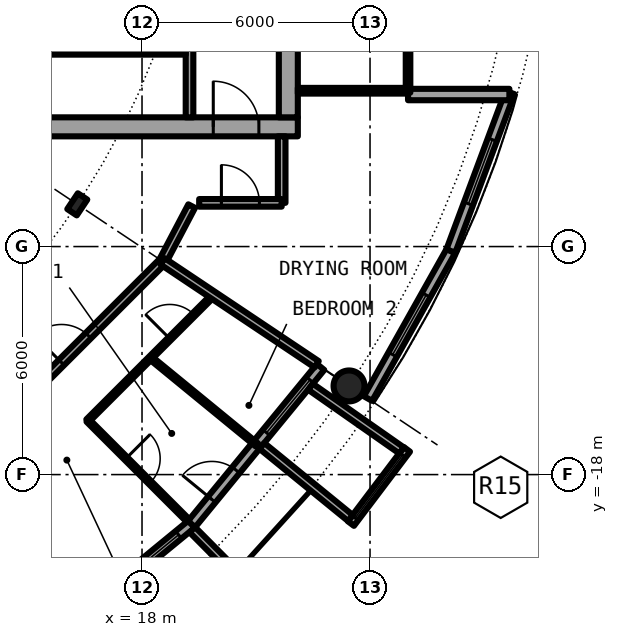
"""IFC4 building model, lengths in metres.
Left out: names, types, materials, properties, quantities, classifications, styles, units other than length and angle.
Written with IfcOpenShell. Run it as: python <this file> out.ifc"""

import sys

from ifc_helpers import new_model, si_unit, direction, frame, frame_2d, origin, origin_2d, place, context, subcontext, project, spatial, rectangle, circle, hollow_circle, i_section, extrude, element, fill, save


model = new_model("IFC4")
c1 = context("Model", 3, precision=1e-05, world=origin(), true_north=direction((0.0, 1.0)))
c2 = subcontext(c1, "Body", "Model", "MODEL_VIEW")
j1 = project(units=[si_unit("LENGTHUNIT", "METRE"), si_unit("PLANEANGLEUNIT", "RADIAN")], contexts=[c1])
p1 = place(None, origin())
s1 = spatial("IfcSite", under=j1, at=p1, CompositionType="ELEMENT")
p2 = place(p1, origin())
s2 = spatial("IfcBuilding", under=s1, at=p2, CompositionType="ELEMENT")
p3 = place(p2, frame((0.0, 0.0, 173.8)))
s3 = spatial("IfcBuildingStorey", under=s2, at=p3, CompositionType="ELEMENT", Elevation=173.8)
p4 = place(p3, frame((23.448, -15.667, 0.0), z_axis=(0.0, 0.0, 1.0), x_axis=(1.0, 0.0, 0.0)))
e1 = element("IfcColumn", 1, at=p4, inside=s3, PredefinedType="COLUMN", context=c2, shape_type="SweptSolid", body=[
    extrude(hollow_circle(Radius=0.406, WallThickness=0.04, at=origin_2d()), origin(), (0.0, 0.0, 1.0), 3.05),
])
p5 = place(p3, frame((16.297, -10.889, 0.0), z_axis=(0.0, 0.0, 1.0), x_axis=(0.831469612303, -0.55557023302, 0.0)))
e2 = element("IfcColumn", 2, at=p5, inside=s3, PredefinedType="COLUMN", context=c2, shape_type="SweptSolid", body=[
    extrude(i_section(OverallWidth=0.3, OverallDepth=0.5, WebThickness=0.014, FlangeThickness=0.028, FilletRadius=0.027, at=origin_2d()), origin(), (0.0, 0.0, 1.0), 3.05),
])
p6 = place(p3, frame((15.167, -22.699, 0.0), z_axis=(0.0, 0.0, 1.0), x_axis=(0.773019449054, 0.634382322723, 0.0)))
e3 = element("IfcWall", 3, at=p6, inside=s3, PredefinedType="SOLIDWALL", context=c2, shape_type="SweptSolid", body=[
    extrude(rectangle(XDim=5.352, YDim=0.25, at=frame_2d((2.676, 0.0))), origin(), (0.0, 0.0, 1.0), 2.7),
])
p7 = place(p6, frame((0.841, 0.0, 0.0)))
e4 = element("IfcOpeningElement", 4, at=p7, cuts=e3, PredefinedType="OPENING", context=c2, shape_type="SweptSolid", body=[
    extrude(rectangle(XDim=1.0, YDim=2.2, at=frame_2d((0.5, 1.1))), frame((0.0, 0.135, 0.0), z_axis=(0.0, -1.0, 0.0), x_axis=(1.0, 0.0, 0.0)), (0.0, 0.0, 1.0), 0.27),
])
p8 = place(p6, frame((3.111, 0.0, 0.3)))
e5 = element("IfcOpeningElement", 5, at=p8, cuts=e3, PredefinedType="OPENING", context=c2, shape_type="SweptSolid", body=[
    extrude(rectangle(XDim=1.8, YDim=2.1, at=frame_2d((0.9, 1.05))), frame((0.0, 0.135, 0.0), z_axis=(0.0, -1.0, 0.0), x_axis=(1.0, 0.0, 0.0)), (0.0, 0.0, 1.0), 0.27),
])
p9 = place(p3, frame((19.323, -19.45, -0.03), z_axis=(0.0, 0.0, 1.0), x_axis=(0.704476739375, -0.709727076896, 0.0)))
e6 = element("IfcWall", 6, at=p9, inside=s3, PredefinedType="SOLIDWALL", context=c2, shape_type="SweptSolid", body=[
    extrude(rectangle(XDim=2.883, YDim=0.2, at=frame_2d((1.441, 0.0))), origin(), (0.0, 0.0, 1.0), 2.73),
])
p10 = place(p3, frame((19.304, -19.304, 0.0), z_axis=(0.0, 0.0, 1.0), x_axis=(0.634382322723, 0.773019449054, 0.0)))
e7 = element("IfcWall", 7, at=p10, inside=s3, PredefinedType="SOLIDWALL", context=c2, shape_type="SweptSolid", body=[
    extrude(rectangle(XDim=5.352, YDim=0.25, at=frame_2d((2.676, 0.0))), origin(), (0.0, 0.0, 1.0), 2.7),
])
p11 = place(p10, frame((0.841, 0.0, 0.0)))
e8 = element("IfcOpeningElement", 8, at=p11, cuts=e7, PredefinedType="OPENING", context=c2, shape_type="SweptSolid", body=[
    extrude(rectangle(XDim=1.0, YDim=2.2, at=frame_2d((0.5, 1.1))), frame((0.0, 0.135, 0.0), z_axis=(0.0, -1.0, 0.0), x_axis=(1.0, 0.0, 0.0)), (0.0, 0.0, 1.0), 0.27),
])
p12 = place(p10, frame((3.111, 0.0, 0.3)))
e9 = element("IfcOpeningElement", 9, at=p12, cuts=e7, PredefinedType="OPENING", context=c2, shape_type="SweptSolid", body=[
    extrude(rectangle(XDim=1.8, YDim=2.1, at=frame_2d((0.9, 1.05))), frame((0.0, 0.135, 0.0), z_axis=(0.0, -1.0, 0.0), x_axis=(1.0, 0.0, 0.0)), (0.0, 0.0, 1.0), 0.27),
])
p13 = place(p3, frame((23.497, -19.289, -0.03), z_axis=(0.0, 0.0, 1.0), x_axis=(0.602806268067, 0.797887588059, 0.0)))
e10 = element("IfcWall", 10, at=p13, inside=s3, PredefinedType="SOLIDWALL", context=c2, shape_type="SweptSolid", body=[
    extrude(rectangle(XDim=2.447, YDim=0.2, at=frame_2d((1.223, 0.0))), origin(), (0.0, 0.0, 1.0), 2.73),
])
p14 = place(p13, frame((0.183, 0.0, 0.33)))
e11 = element("IfcOpeningElement", 11, at=p14, cuts=e10, PredefinedType="OPENING", context=c2, shape_type="SweptSolid", body=[
    extrude(circle(Radius=1.04, at=frame_2d((1.04, 1.04))), frame((0.0, 0.11, 0.0), z_axis=(0.0, -1.0, 0.0), x_axis=(1.0, 0.0, 0.0)), (0.0, 0.0, 1.0), 0.22),
])
p15 = place(p3, frame((21.155, -17.246, -0.03), z_axis=(0.0, 0.0, 1.0), x_axis=(0.775179004516, -0.631741648902, 0.0)))
e12 = element("IfcWall", 12, at=p15, inside=s3, PredefinedType="SOLIDWALL", context=c2, shape_type="SweptSolid", body=[
    extrude(rectangle(XDim=3.006, YDim=0.2, at=frame_2d((1.503, 0.0))), origin(), (0.0, 0.0, 1.0), 2.73),
])
p16 = place(p3, frame((22.433, -15.688, -0.03), z_axis=(0.0, 0.0, 1.0), x_axis=(0.819373043115, -0.573260687834, 0.0)))
e13 = element("IfcWall", 13, at=p16, inside=s3, PredefinedType="SOLIDWALL", context=c2, shape_type="SweptSolid", body=[
    extrude(rectangle(XDim=2.925, YDim=0.2, at=frame_2d((1.463, 0.0))), origin(), (0.0, 0.0, 1.0), 2.73),
])
p17 = place(p3, frame((23.946, -16.0, 0.0), z_axis=(0.0, 0.0, 1.0), x_axis=(0.489696356642, 0.871893042919, 0.0)))
e14 = element("IfcWall", 14, at=p17, inside=s3, PredefinedType="SOLIDWALL", context=c2, shape_type="SweptSolid", body=[
    extrude(rectangle(XDim=4.454, YDim=0.25, at=frame_2d((2.227, 0.0))), origin(), (0.0, 0.0, 1.0), 2.7),
])
p18 = place(p17, frame((1.327, 0.0, 0.3)))
e15 = element("IfcOpeningElement", 15, at=p18, cuts=e14, PredefinedType="OPENING", context=c2, shape_type="SweptSolid", body=[
    extrude(rectangle(XDim=1.8, YDim=2.1, at=frame_2d((0.9, 1.05))), frame((0.0, 0.135, 0.0), z_axis=(0.0, -1.0, 0.0), x_axis=(1.0, 0.0, 0.0)), (0.0, 0.0, 1.0), 0.27),
])
p19 = place(p3, frame((26.127, -12.117, 0.0), z_axis=(0.0, 0.0, 1.0), x_axis=(0.349247811493, 0.937030397675, 0.0)))
e16 = element("IfcWall", 16, at=p19, inside=s3, PredefinedType="SOLIDWALL", context=c2, shape_type="SweptSolid", body=[
    extrude(rectangle(XDim=4.452, YDim=0.25, at=frame_2d((2.226, 0.0))), origin(), (0.0, 0.0, 1.0), 2.7),
])
p20 = place(p19, frame((1.327, 0.0, 0.3)))
e17 = element("IfcOpeningElement", 17, at=p20, cuts=e16, PredefinedType="OPENING", context=c2, shape_type="SweptSolid", body=[
    extrude(rectangle(XDim=1.8, YDim=2.1, at=frame_2d((0.9, 1.05))), frame((0.0, 0.135, 0.0), z_axis=(0.0, -1.0, 0.0), x_axis=(1.0, 0.0, 0.0)), (0.0, 0.0, 1.0), 0.27),
])
p21 = place(p3, frame((25.0, -8.0, 0.0), z_axis=(0.0, 0.0, 1.0), x_axis=(1.0, 0.0, 0.0)))
e18 = element("IfcWall", 18, at=p21, inside=s3, PredefinedType="SOLIDWALL", context=c2, shape_type="SweptSolid", body=[
    extrude(rectangle(XDim=2.667, YDim=0.3, at=frame_2d((1.333, 0.0))), origin(), (0.0, 0.0, 1.0), 2.7),
])
p22 = place(p3, frame((8.5, -8.85, 0.0), z_axis=(0.0, 0.0, 1.0), x_axis=(1.0, 0.0, 0.0)))
e19 = element("IfcWall", 19, at=p22, inside=s3, PredefinedType="SHEAR", context=c2, shape_type="SweptSolid", body=[
    extrude(rectangle(XDim=13.6, YDim=0.5, at=frame_2d((6.8, 0.0))), origin(), (0.0, 0.0, 1.0), 3.05),
])
p23 = place(p22, frame((11.375, 0.0, 0.0)))
e20 = element("IfcOpeningElement", 20, at=p23, cuts=e19, PredefinedType="OPENING", context=c2, shape_type="SweptSolid", body=[
    extrude(rectangle(XDim=1.2, YDim=2.3, at=frame_2d((0.6, 1.15))), frame((0.0, 0.26, 0.0), z_axis=(0.0, -1.0, 0.0), x_axis=(1.0, 0.0, 0.0)), (0.0, 0.0, 1.0), 0.52),
])
p24 = place(p3, frame((21.85, 8.6, 0.0), z_axis=(0.0, 0.0, 1.0), x_axis=(0.0, -1.0, 0.0)))
e21 = element("IfcWall", 21, at=p24, inside=s3, PredefinedType="SHEAR", context=c2, shape_type="SweptSolid", body=[
    extrude(rectangle(XDim=17.2, YDim=0.5, at=frame_2d((8.6, 0.0))), origin(), (0.0, 0.0, 1.0), 3.05),
])
p25 = place(p24, frame((7.7, 0.0, 0.0)))
e22 = element("IfcOpeningElement", 22, at=p25, cuts=e21, PredefinedType="OPENING", context=c2, shape_type="SweptSolid", body=[
    extrude(rectangle(XDim=1.8, YDim=2.3, at=frame_2d((0.9, 1.15))), frame((0.0, 0.26, 0.0), z_axis=(0.0, -1.0, 0.0), x_axis=(1.0, 0.0, 0.0)), (0.0, 0.0, 1.0), 0.52),
])
p26 = place(p3, frame((19.25, -8.6, 0.0), z_axis=(0.0, 0.0, 1.0), x_axis=(0.0, 1.0, 0.0)))
e23 = element("IfcWall", 23, at=p26, inside=s3, PredefinedType="SOLIDWALL", context=c2, shape_type="SweptSolid", body=[
    extrude(rectangle(XDim=7.025, YDim=0.2, at=frame_2d((3.513, 0.0))), origin(), (0.0, 0.0, 1.0), 2.7),
])
p27 = place(p26, frame((2.35, 0.0, 0.0)))
e24 = element("IfcOpeningElement", 24, at=p27, cuts=e23, PredefinedType="OPENING", context=c2, shape_type="SweptSolid", body=[
    extrude(rectangle(XDim=1.1, YDim=2.3, at=frame_2d((0.55, 1.15))), frame((0.0, 0.11, 0.0), z_axis=(0.0, -1.0, 0.0), x_axis=(1.0, 0.0, 0.0)), (0.0, 0.0, 1.0), 0.22),
])
p28 = place(p3, frame((15.45, -6.875, 0.0), z_axis=(0.0, 0.0, 1.0), x_axis=(1.0, 0.0, 0.0)))
e25 = element("IfcWall", 25, at=p28, inside=s3, PredefinedType="PARTITIONING", context=c2, shape_type="SweptSolid", body=[
    extrude(rectangle(XDim=3.7, YDim=0.15, at=frame_2d((1.85, 0.0))), origin(), (0.0, 0.0, 1.0), 2.7),
])
p29 = place(p28, frame((1.4, 0.0, 0.0)))
e26 = element("IfcOpeningElement", 26, at=p29, cuts=e25, PredefinedType="OPENING", context=c2, shape_type="SweptSolid", body=[
    extrude(rectangle(XDim=0.9, YDim=2.3, at=frame_2d((0.45, 1.15))), frame((0.0, 0.085, 0.0), z_axis=(0.0, -1.0, 0.0), x_axis=(1.0, 0.0, 0.0)), (0.0, 0.0, 1.0), 0.17),
])
p30 = place(p3, frame((22.1, -7.9, 0.0), z_axis=(0.0, 0.0, 1.0), x_axis=(1.0, 0.0, 0.0)))
e27 = element("IfcWall", 27, at=p30, inside=s3, PredefinedType="PARTITIONING", context=c2, shape_type="SweptSolid", body=[
    extrude(rectangle(XDim=2.84, YDim=0.15, at=frame_2d((1.42, 0.0))), origin(), (0.0, 0.0, 1.0), 2.7),
])
p31 = place(p3, frame((25.0, -7.95, 0.0), z_axis=(0.0, 0.0, 1.0), x_axis=(0.0, 1.0, 0.0)))
e28 = element("IfcWall", 28, at=p31, inside=s3, PredefinedType="PARTITIONING", context=c2, shape_type="SweptSolid", body=[
    extrude(rectangle(XDim=15.9, YDim=0.12, at=frame_2d((7.95, 0.0))), origin(), (0.0, 0.0, 1.0), 2.7),
])
p32 = place(p31, frame((0.95, 0.0, 0.1)))
e29 = element("IfcOpeningElement", 29, at=p32, cuts=e28, PredefinedType="OPENING", context=c2, shape_type="SweptSolid", body=[
    extrude(rectangle(XDim=14.0, YDim=2.35, at=frame_2d((7.0, 1.175))), frame((0.0, 0.07, 0.0), z_axis=(0.0, -1.0, 0.0), x_axis=(1.0, 0.0, 0.0)), (0.0, 0.0, 1.0), 0.14),
])
p33 = place(p3, frame((16.569, -16.583, 0.0), z_axis=(0.0, 0.0, 1.0), x_axis=(0.707316201218, 0.706897299114, 0.0)))
e30 = element("IfcWall", 30, at=p33, inside=s3, PredefinedType="PARTITIONING", context=c2, shape_type="SweptSolid", body=[
    extrude(rectangle(XDim=4.663, YDim=0.1, at=frame_2d((2.331, 0.0))), origin(), (0.0, 0.0, 1.0), 2.7),
])
p34 = place(p33, frame((3.055, 0.0, 0.0)))
e31 = element("IfcOpeningElement", 31, at=p34, cuts=e30, PredefinedType="OPENING", context=c2, shape_type="SweptSolid", body=[
    extrude(rectangle(XDim=0.9, YDim=2.3, at=frame_2d((0.45, 1.15))), frame((0.0, 0.06, 0.0), z_axis=(0.0, -1.0, 0.0), x_axis=(1.0, 0.0, 0.0)), (0.0, 0.0, 1.0), 0.12),
])
p35 = place(p3, frame((18.542, -12.389, 0.0), z_axis=(0.0, 0.0, 1.0), x_axis=(0.465605550524, 0.884992356646, 0.0)))
e32 = element("IfcWall", 32, at=p35, inside=s3, PredefinedType="PARTITIONING", context=c2, shape_type="SweptSolid", body=[
    extrude(rectangle(XDim=1.643, YDim=0.2, at=frame_2d((0.821, 0.0))), origin(), (0.0, 0.0, 1.0), 2.7),
])
p36 = place(p3, frame((12.389, -18.542, 0.0), z_axis=(0.0, 0.0, 1.0), x_axis=(0.707106781187, 0.707106781187, 0.0)))
e33 = element("IfcWall", 33, at=p36, inside=s3, PredefinedType="PARTITIONING", context=c2, shape_type="SweptSolid", body=[
    extrude(rectangle(XDim=8.702, YDim=0.2, at=frame_2d((4.351, 0.0))), origin(), (0.0, 0.0, 1.0), 2.7),
])
p37 = place(p36, frame((4.938, 0.0, 0.0)))
e34 = element("IfcOpeningElement", 34, at=p37, cuts=e33, PredefinedType="OPENING", context=c2, shape_type="SweptSolid", body=[
    extrude(rectangle(XDim=1.0, YDim=2.3, at=frame_2d((0.5, 1.15))), frame((0.0, 0.11, 0.0), z_axis=(0.0, -1.0, 0.0), x_axis=(1.0, 0.0, 0.0)), (0.0, 0.0, 1.0), 0.22),
])
p38 = place(p3, frame((21.675, -10.85, 0.0), z_axis=(0.0, 0.0, 1.0), x_axis=(0.0, 1.0, 0.0)))
e35 = element("IfcWall", 35, at=p38, inside=s3, PredefinedType="PARTITIONING", context=c2, shape_type="SweptSolid", body=[
    extrude(rectangle(XDim=1.75, YDim=0.2, at=frame_2d((0.875, 0.0))), origin(), (0.0, 0.0, 1.0), 2.7),
])
p39 = place(p3, frame((19.504, -10.85, 0.0), z_axis=(0.0, 0.0, 1.0), x_axis=(1.0, 0.0, 0.0)))
e36 = element("IfcWall", 36, at=p39, inside=s3, PredefinedType="PARTITIONING", context=c2, shape_type="SweptSolid", body=[
    extrude(rectangle(XDim=2.171, YDim=0.2, at=frame_2d((1.085, 0.0))), origin(), (0.0, 0.0, 1.0), 2.7),
])
p40 = place(p39, frame((0.585, 0.0, 0.0)))
e37 = element("IfcOpeningElement", 37, at=p40, cuts=e36, PredefinedType="OPENING", context=c2, shape_type="SweptSolid", body=[
    extrude(rectangle(XDim=1.0, YDim=2.3, at=frame_2d((0.5, 1.15))), frame((0.0, 0.11, 0.0), z_axis=(0.0, -1.0, 0.0), x_axis=(1.0, 0.0, 0.0)), (0.0, 0.0, 1.0), 0.22),
])
p41 = place(p3, frame((16.575, -16.575, 0.0), z_axis=(0.0, 0.0, 1.0), x_axis=(0.707106781187, -0.707106781187, 0.0)))
e38 = element("IfcWall", 38, at=p41, inside=s3, PredefinedType="PARTITIONING", context=c2, shape_type="SweptSolid", body=[
    extrude(rectangle(XDim=3.735, YDim=0.1, at=frame_2d((1.868, 0.0))), origin(), (0.0, 0.0, 1.0), 2.7),
])
p42 = place(p41, frame((1.418, 0.0, 0.0)))
e39 = element("IfcOpeningElement", 39, at=p42, cuts=e38, PredefinedType="OPENING", context=c2, shape_type="SweptSolid", body=[
    extrude(rectangle(XDim=0.9, YDim=2.3, at=frame_2d((0.45, 1.15))), frame((0.0, 0.06, 0.0), z_axis=(0.0, -1.0, 0.0), x_axis=(1.0, 0.0, 0.0)), (0.0, 0.0, 1.0), 0.12),
])
p43 = place(p3, frame((18.224, -14.927, 0.0), z_axis=(0.0, 0.0, 1.0), x_axis=(0.773548271597, -0.633737383709, 0.0)))
e40 = element("IfcWall", 40, at=p43, inside=s3, PredefinedType="PARTITIONING", context=c2, shape_type="SweptSolid", body=[
    extrude(rectangle(XDim=3.618, YDim=0.1, at=frame_2d((1.809, 0.0))), origin(), (0.0, 0.0, 1.0), 2.7),
])
p44 = place(p3, frame((18.542, -12.389, 0.0), z_axis=(0.0, 0.0, 1.0), x_axis=(0.831387096605, -0.55569370664, 0.0)))
e41 = element("IfcWall", 41, at=p44, inside=s3, PredefinedType="PARTITIONING", context=c2, shape_type="SweptSolid", body=[
    extrude(rectangle(XDim=4.875, YDim=0.2, at=frame_2d((2.438, 0.0))), origin(), (0.0, 0.0, 1.0), 2.7),
])
p45 = place(p8, origin())
e42 = element("IfcWindow", 42, at=p45, inside=s3, PartitioningType="SINGLE_PANEL", PredefinedType="WINDOW", context=c2, shape_type="SweptSolid", body=[
    extrude(rectangle(XDim=1.8, YDim=2.1, at=frame_2d((0.9, 1.05))), frame((0.0, 0.03, 0.0), z_axis=(0.0, -1.0, 0.0), x_axis=(1.0, 0.0, 0.0)), (0.0, 0.0, 1.0), 0.06),
])
fill(e5, e42)
p46 = place(p11, origin())
e43 = element("IfcDoor", 43, at=p46, inside=s3, OperationType="SINGLE_SWING_LEFT", PredefinedType="DOOR", context=c2, shape_type="SweptSolid", body=[
    extrude(rectangle(XDim=1.0, YDim=2.2, at=frame_2d((0.5, 1.1))), frame((0.0, 0.025, 0.0), z_axis=(0.0, -1.0, 0.0), x_axis=(1.0, 0.0, 0.0)), (0.0, 0.0, 1.0), 0.05),
])
fill(e8, e43)
p47 = place(p12, origin())
e44 = element("IfcWindow", 44, at=p47, inside=s3, PartitioningType="SINGLE_PANEL", PredefinedType="WINDOW", context=c2, shape_type="SweptSolid", body=[
    extrude(rectangle(XDim=1.8, YDim=2.1, at=frame_2d((0.9, 1.05))), frame((0.0, 0.03, 0.0), z_axis=(0.0, -1.0, 0.0), x_axis=(1.0, 0.0, 0.0)), (0.0, 0.0, 1.0), 0.06),
])
fill(e9, e44)
p48 = place(p14, origin())
e45 = element("IfcWindow", 45, at=p48, inside=s3, PartitioningType="SINGLE_PANEL", PredefinedType="WINDOW", context=c2, shape_type="SweptSolid", body=[
    extrude(circle(Radius=1.04, at=frame_2d((1.04, 1.04))), frame((0.0, 0.03, 0.0), z_axis=(0.0, -1.0, 0.0), x_axis=(1.0, 0.0, 0.0)), (0.0, 0.0, 1.0), 0.06),
])
fill(e11, e45)
p49 = place(p18, origin())
e46 = element("IfcWindow", 46, at=p49, inside=s3, PartitioningType="SINGLE_PANEL", PredefinedType="WINDOW", context=c2, shape_type="SweptSolid", body=[
    extrude(rectangle(XDim=1.8, YDim=2.1, at=frame_2d((0.9, 1.05))), frame((0.0, 0.03, 0.0), z_axis=(0.0, -1.0, 0.0), x_axis=(1.0, 0.0, 0.0)), (0.0, 0.0, 1.0), 0.06),
])
fill(e15, e46)
p50 = place(p20, origin())
e47 = element("IfcWindow", 47, at=p50, inside=s3, PartitioningType="SINGLE_PANEL", PredefinedType="WINDOW", context=c2, shape_type="SweptSolid", body=[
    extrude(rectangle(XDim=1.8, YDim=2.1, at=frame_2d((0.9, 1.05))), frame((0.0, 0.03, 0.0), z_axis=(0.0, -1.0, 0.0), x_axis=(1.0, 0.0, 0.0)), (0.0, 0.0, 1.0), 0.06),
])
fill(e17, e47)
p51 = place(p29, origin())
e48 = element("IfcDoor", 48, at=p51, inside=s3, OperationType="SINGLE_SWING_LEFT", PredefinedType="DOOR", context=c2, shape_type="SweptSolid", body=[
    extrude(rectangle(XDim=0.9, YDim=2.3, at=frame_2d((0.45, 1.15))), frame((0.0, 0.025, 0.0), z_axis=(0.0, -1.0, 0.0), x_axis=(1.0, 0.0, 0.0)), (0.0, 0.0, 1.0), 0.05),
])
fill(e26, e48)
p52 = place(p23, origin())
e49 = element("IfcDoor", 49, at=p52, inside=s3, OperationType="SINGLE_SWING_LEFT", PredefinedType="DOOR", context=c2, shape_type="SweptSolid", body=[
    extrude(rectangle(XDim=1.2, YDim=2.3, at=frame_2d((0.6, 1.15))), frame((0.0, 0.025, 0.0), z_axis=(0.0, -1.0, 0.0), x_axis=(1.0, 0.0, 0.0)), (0.0, 0.0, 1.0), 0.05),
])
fill(e20, e49)
p53 = place(p32, origin())
e50 = element("IfcWindow", 50, at=p53, inside=s3, PartitioningType="SINGLE_PANEL", PredefinedType="WINDOW", context=c2, shape_type="SweptSolid", body=[
    extrude(rectangle(XDim=14.0, YDim=2.35, at=frame_2d((7.0, 1.175))), frame((0.0, 0.03, 0.0), z_axis=(0.0, -1.0, 0.0), x_axis=(1.0, 0.0, 0.0)), (0.0, 0.0, 1.0), 0.06),
])
fill(e29, e50)
p54 = place(p37, origin())
e51 = element("IfcDoor", 51, at=p54, inside=s3, OperationType="SINGLE_SWING_RIGHT", PredefinedType="DOOR", context=c2, shape_type="SweptSolid", body=[
    extrude(rectangle(XDim=1.0, YDim=2.3, at=frame_2d((0.5, 1.15))), frame((0.0, 0.025, 0.0), z_axis=(0.0, -1.0, 0.0), x_axis=(1.0, 0.0, 0.0)), (0.0, 0.0, 1.0), 0.05),
])
fill(e34, e51)
p55 = place(p42, origin())
e52 = element("IfcDoor", 52, at=p55, inside=s3, OperationType="SINGLE_SWING_RIGHT", PredefinedType="DOOR", context=c2, shape_type="SweptSolid", body=[
    extrude(rectangle(XDim=0.9, YDim=2.3, at=frame_2d((0.45, 1.15))), frame((0.0, 0.025, 0.0), z_axis=(0.0, -1.0, 0.0), x_axis=(1.0, 0.0, 0.0)), (0.0, 0.0, 1.0), 0.05),
])
fill(e39, e52)
p56 = place(p34, origin())
e53 = element("IfcDoor", 53, at=p56, inside=s3, OperationType="SINGLE_SWING_RIGHT", PredefinedType="DOOR", context=c2, shape_type="SweptSolid", body=[
    extrude(rectangle(XDim=0.9, YDim=2.3, at=frame_2d((0.45, 1.15))), frame((0.0, 0.025, 0.0), z_axis=(0.0, -1.0, 0.0), x_axis=(1.0, 0.0, 0.0)), (0.0, 0.0, 1.0), 0.05),
])
fill(e31, e53)
p57 = place(p40, origin())
e54 = element("IfcDoor", 54, at=p57, inside=s3, OperationType="SINGLE_SWING_LEFT", PredefinedType="DOOR", context=c2, shape_type="SweptSolid", body=[
    extrude(rectangle(XDim=1.0, YDim=2.3, at=frame_2d((0.5, 1.15))), frame((0.0, 0.025, 0.0), z_axis=(0.0, -1.0, 0.0), x_axis=(1.0, 0.0, 0.0)), (0.0, 0.0, 1.0), 0.05),
])
fill(e37, e54)
save(model, sys.argv[1])
